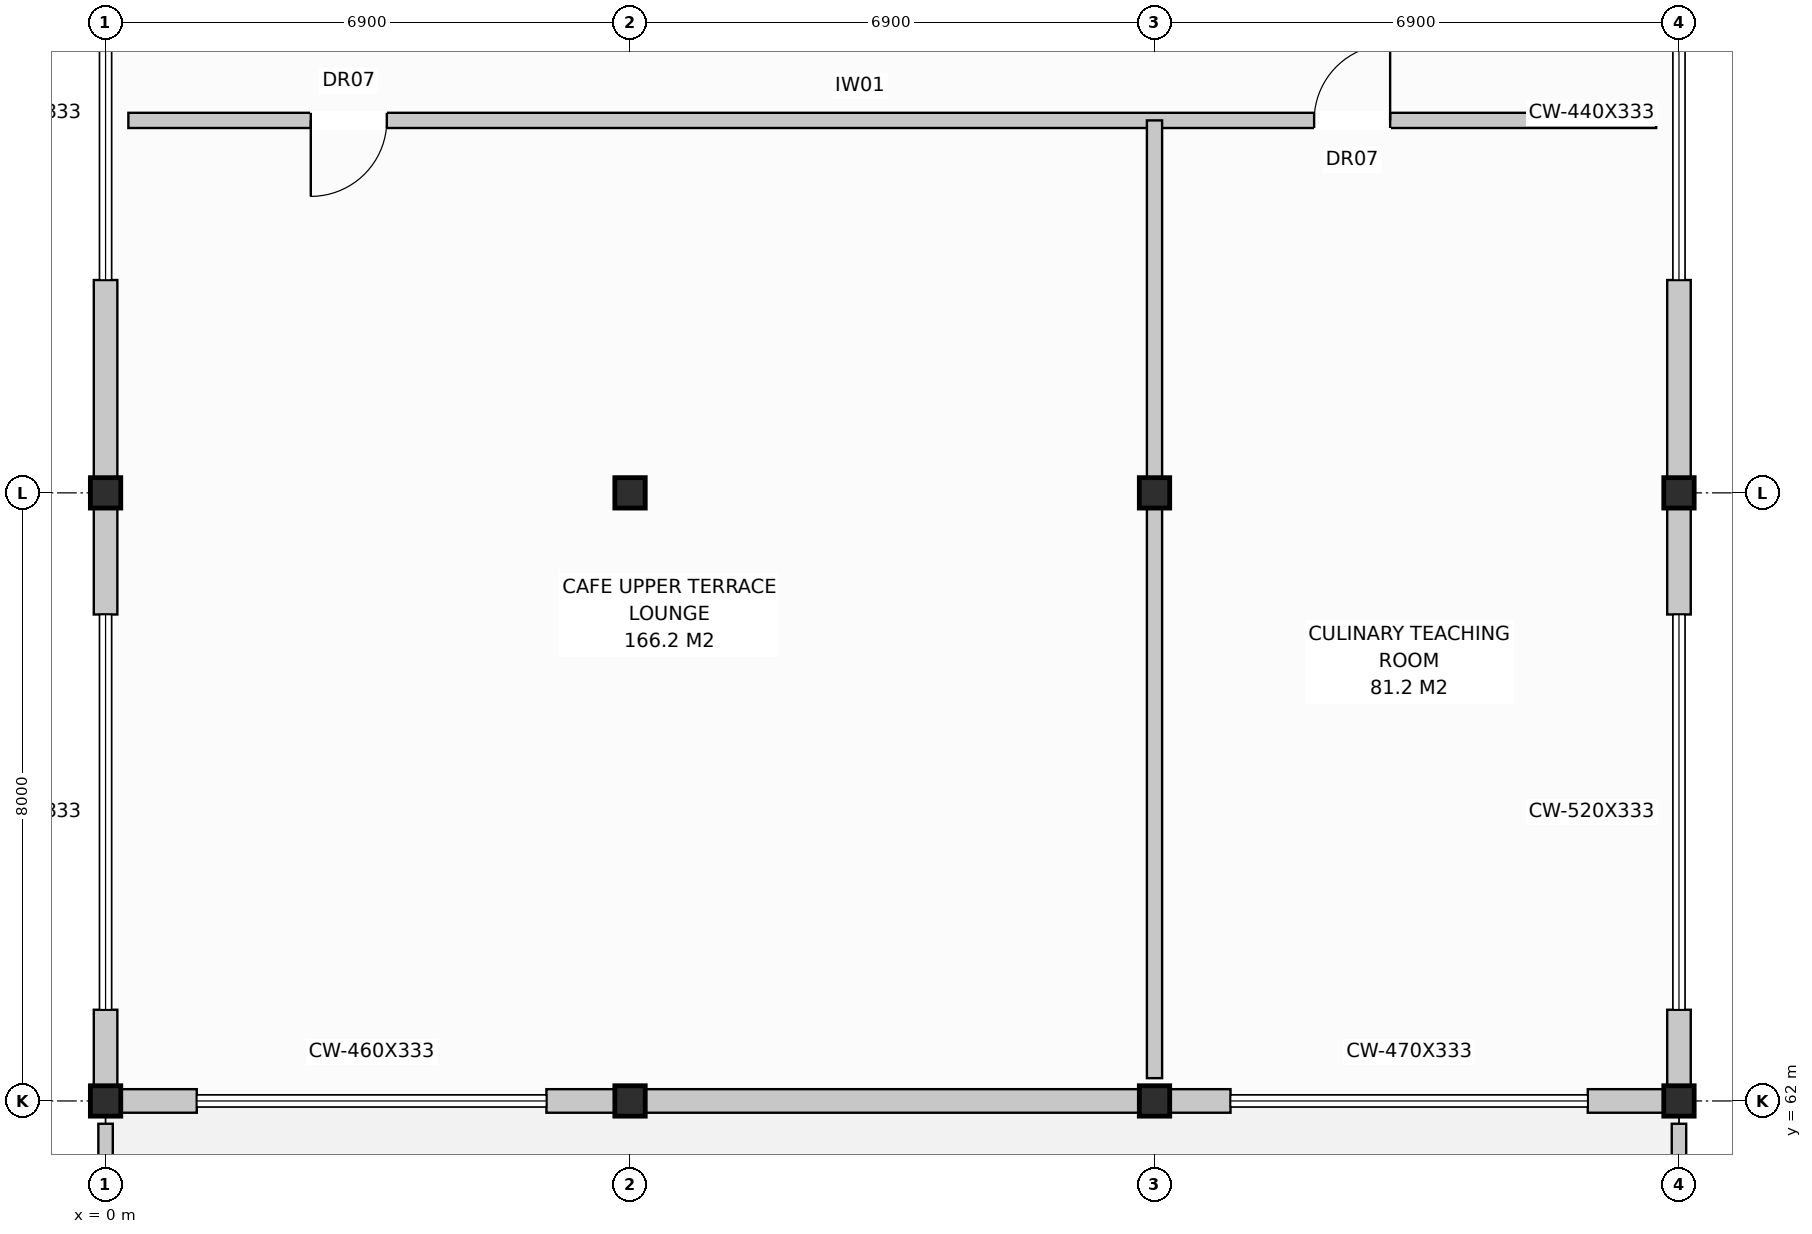
"""IFC4 building model, lengths in metres.
Left out: names, types, materials, properties, quantities, classifications, styles, units other than length and angle.
Written with IfcOpenShell. Run it as: python <this file> out.ifc"""

import sys

from ifc_helpers import new_model, si_unit, direction, frame, frame_2d, origin, origin_with_axes, origin_2d, place, context, subcontext, project, spatial, rectangle, extrude, element, fill, save


model = new_model("IFC4")
c1 = context("Model", 3, precision=1e-05, world=origin(), true_north=direction((0.0, 1.0)))
c2 = subcontext(c1, "Body", "Model", "MODEL_VIEW")
j1 = project(units=[si_unit("LENGTHUNIT", "METRE"), si_unit("PLANEANGLEUNIT", "RADIAN")], contexts=[c1])
p1 = place(None, origin())
s1 = spatial("IfcSite", under=j1, at=p1, CompositionType="ELEMENT")
p2 = place(p1, origin())
s2 = spatial("IfcBuilding", under=s1, at=p2, CompositionType="ELEMENT")
p3 = place(p2, frame((0.0, 0.0, 4.4)))
s3 = spatial("IfcBuildingStorey", under=s2, at=p3, CompositionType="ELEMENT", Elevation=4.4)
for number, where, z_axis, x_axis in (
    (1, (0.0, 62.0, 0.0), (0.0, 0.0, 1.0), (1.0, 0.0, 0.0)),
    (2, (0.0, 70.0, 0.0), (0.0, 0.0, 1.0), (1.0, 0.0, 0.0)),
    (3, (6.9, 62.0, 0.0), (0.0, 0.0, 1.0), (1.0, 0.0, 0.0)),
    (4, (6.9, 70.0, 0.0), (0.0, 0.0, 1.0), (1.0, 0.0, 0.0)),
    (5, (13.8, 62.0, 0.0), (0.0, 0.0, 1.0), (1.0, 0.0, 0.0)),
    (6, (13.8, 70.0, 0.0), (0.0, 0.0, 1.0), (1.0, 0.0, 0.0)),
    (7, (20.7, 62.0, 0.0), (0.0, 0.0, 1.0), (1.0, 0.0, 0.0)),
    (8, (20.7, 70.0, 0.0), (0.0, 0.0, 1.0), (1.0, 0.0, 0.0)),
):
    element("IfcColumn", number, at=place(p3, frame(where, z_axis=z_axis, x_axis=x_axis)), inside=s3, PredefinedType="COLUMN", context=c2, shape_type="SweptSolid", body=[
        extrude(rectangle(XDim=0.4, YDim=0.4, at=origin_2d()), origin(), (0.0, 0.0, 1.0), 3.6),
    ])
p4 = place(p3, frame((0.0, 62.0, 0.0), z_axis=(0.0, 0.0, 1.0), x_axis=(0.0, 1.0, 0.0)))
e9 = element("IfcWall", 9, at=p4, inside=s3, PredefinedType="STANDARD", context=c2, shape_type="SweptSolid", body=[
    extrude(rectangle(XDim=1.2, YDim=0.31, at=frame_2d((0.6, 0.0))), origin(), (0.0, 0.0, 1.0), 3.33),
])
p5 = place(p3, frame((0.0, 68.4, 0.0), z_axis=(0.0, 0.0, 1.0), x_axis=(0.0, 1.0, 0.0)))
e10 = element("IfcWall", 10, at=p5, inside=s3, PredefinedType="STANDARD", context=c2, shape_type="SweptSolid", body=[
    extrude(rectangle(XDim=4.4, YDim=0.31, at=frame_2d((2.2, 0.0))), origin(), (0.0, 0.0, 1.0), 3.33),
])
p6 = place(p3, frame((20.7, 62.0, 0.0), z_axis=(0.0, 0.0, 1.0), x_axis=(0.0, 1.0, 0.0)))
e11 = element("IfcWall", 11, at=p6, inside=s3, PredefinedType="STANDARD", context=c2, shape_type="SweptSolid", body=[
    extrude(rectangle(XDim=1.2, YDim=0.31, at=frame_2d((0.6, 0.0))), origin(), (0.0, 0.0, 1.0), 3.33),
])
p7 = place(p3, frame((20.7, 68.4, 0.0), z_axis=(0.0, 0.0, 1.0), x_axis=(0.0, 1.0, 0.0)))
e12 = element("IfcWall", 12, at=p7, inside=s3, PredefinedType="STANDARD", context=c2, shape_type="SweptSolid", body=[
    extrude(rectangle(XDim=4.4, YDim=0.31, at=frame_2d((2.2, 0.0))), origin(), (0.0, 0.0, 1.0), 3.33),
])
p8 = place(p3, frame((0.0, 62.0, 0.0), z_axis=(0.0, 0.0, 1.0), x_axis=(1.0, 0.0, 0.0)))
e13 = element("IfcWall", 13, at=p8, inside=s3, PredefinedType="STANDARD", context=c2, shape_type="SweptSolid", body=[
    extrude(rectangle(XDim=1.2, YDim=0.31, at=frame_2d((0.6, 0.0))), origin(), (0.0, 0.0, 1.0), 3.33),
])
p9 = place(p3, frame((5.8, 62.0, 0.0), z_axis=(0.0, 0.0, 1.0), x_axis=(1.0, 0.0, 0.0)))
e14 = element("IfcWall", 14, at=p9, inside=s3, PredefinedType="STANDARD", context=c2, shape_type="SweptSolid", body=[
    extrude(rectangle(XDim=9.0, YDim=0.31, at=frame_2d((4.5, 0.0))), origin(), (0.0, 0.0, 1.0), 3.33),
])
p10 = place(p3, frame((19.5, 62.0, 0.0), z_axis=(0.0, 0.0, 1.0), x_axis=(1.0, 0.0, 0.0)))
e15 = element("IfcWall", 15, at=p10, inside=s3, PredefinedType="STANDARD", context=c2, shape_type="SweptSolid", body=[
    extrude(rectangle(XDim=1.2, YDim=0.31, at=frame_2d((0.6, 0.0))), origin(), (0.0, 0.0, 1.0), 3.33),
])
for number, where, z_axis, x_axis in (
    (16, (0.0, 54.3, 0.55), (0.0, 0.0, 1.0), (0.0, 1.0, 0.0)),
    (17, (20.7, 54.3, 0.55), (0.0, 0.0, 1.0), (0.0, 1.0, 0.0)),
):
    element("IfcWall", number, at=place(p3, frame(where, z_axis=z_axis, x_axis=x_axis)), inside=s3, PredefinedType="PARAPET", context=c2, shape_type="SweptSolid", body=[
        extrude(rectangle(XDim=7.4, YDim=0.19, at=frame_2d((3.7, 0.0))), origin(), (0.0, 0.0, 1.0), 0.6),
    ])
p11 = place(p3, frame((0.3, 74.9, 0.0), z_axis=(0.0, 0.0, 1.0), x_axis=(1.0, 0.0, 0.0)))
e18 = element("IfcWall", 18, at=p11, inside=s3, PredefinedType="PARTITIONING", context=c2, shape_type="SweptSolid", body=[
    extrude(rectangle(XDim=20.1, YDim=0.2, at=frame_2d((10.05, 0.0))), origin(), (0.0, 0.0, 1.0), 3.33),
])
p12 = place(p11, frame((2.4, 0.0, 0.0)))
e19 = element("IfcOpeningElement", 19, at=p12, cuts=e18, PredefinedType="OPENING", context=c2, shape_type="SweptSolid", body=[
    extrude(rectangle(XDim=1.0, YDim=2.15, at=frame_2d((0.5, 1.075))), frame((0.0, 0.112, 0.0), z_axis=(0.0, -1.0, 0.0), x_axis=(1.0, 0.0, 0.0)), (0.0, 0.0, 1.0), 0.224),
])
p13 = place(p11, frame((15.6, 0.0, 0.0)))
e20 = element("IfcOpeningElement", 20, at=p13, cuts=e18, PredefinedType="OPENING", context=c2, shape_type="SweptSolid", body=[
    extrude(rectangle(XDim=1.0, YDim=2.15, at=frame_2d((0.5, 1.075))), frame((0.0, 0.112, 0.0), z_axis=(0.0, -1.0, 0.0), x_axis=(1.0, 0.0, 0.0)), (0.0, 0.0, 1.0), 0.224),
])
p14 = place(p3, frame((13.8, 62.3, 0.0), z_axis=(0.0, 0.0, 1.0), x_axis=(0.0, 1.0, 0.0)))
e21 = element("IfcWall", 21, at=p14, inside=s3, PredefinedType="PARTITIONING", context=c2, shape_type="SweptSolid", body=[
    extrude(rectangle(XDim=12.6, YDim=0.2, at=frame_2d((6.3, 0.0))), origin(), (0.0, 0.0, 1.0), 3.33),
])
p15 = place(p12, frame((1.0, 0.0, 0.0), z_axis=(0.0, 0.0, 1.0), x_axis=(-1.0, 0.0, 0.0)))
e22 = element("IfcDoor", 22, at=p15, inside=s3, OperationType="SINGLE_SWING_LEFT", PredefinedType="DOOR", context=c2, shape_type="SweptSolid", body=[
    extrude(rectangle(XDim=1.0, YDim=2.15, at=frame_2d((0.5, 1.075))), frame((0.0, 0.025, 0.0), z_axis=(0.0, -1.0, 0.0), x_axis=(1.0, 0.0, 0.0)), (0.0, 0.0, 1.0), 0.05),
])
fill(e19, e22)
p16 = place(p13, origin_with_axes())
e23 = element("IfcDoor", 23, at=p16, inside=s3, OperationType="SINGLE_SWING_RIGHT", PredefinedType="DOOR", context=c2, shape_type="SweptSolid", body=[
    extrude(rectangle(XDim=1.0, YDim=2.15, at=frame_2d((0.5, 1.075))), frame((0.0, 0.025, 0.0), z_axis=(0.0, -1.0, 0.0), x_axis=(1.0, 0.0, 0.0)), (0.0, 0.0, 1.0), 0.05),
])
fill(e20, e23)
save(model, sys.argv[1])
